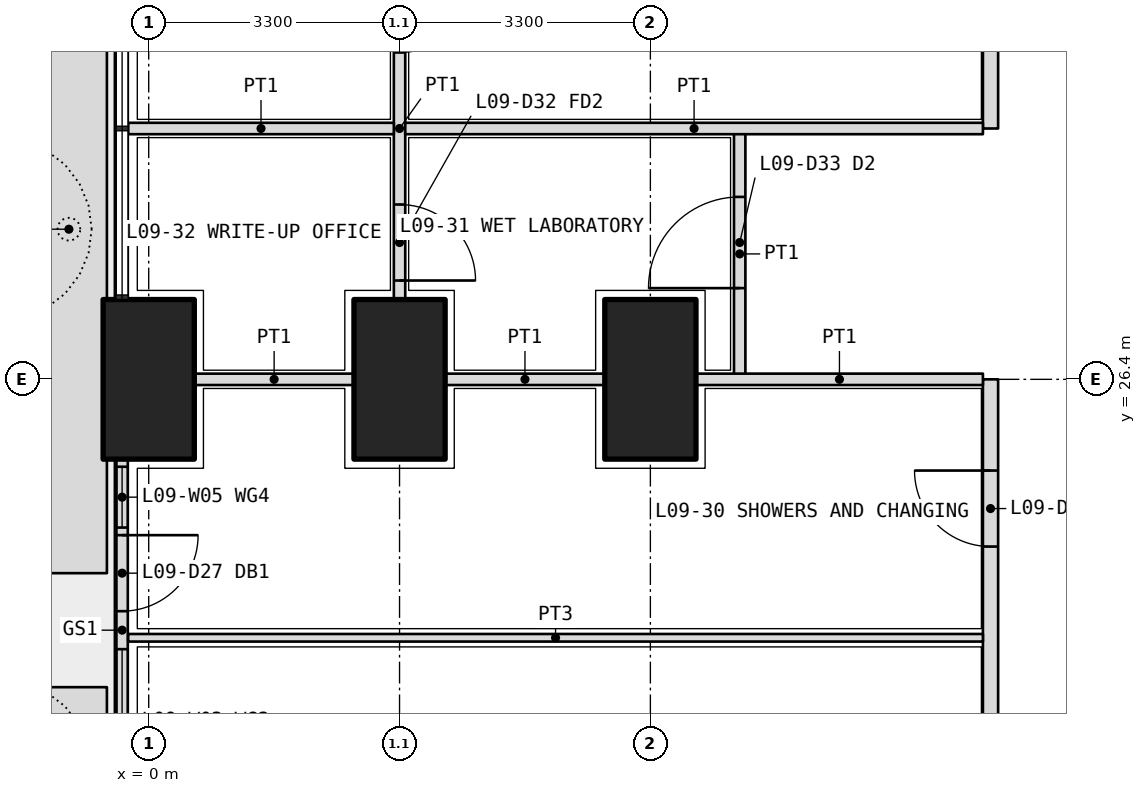
"""IFC4 building model, lengths in metres.
Left out: names, types, materials, properties, quantities, classifications, styles, units other than length and angle.
Written with IfcOpenShell. Run it as: python <this file> out.ifc"""

import sys

from ifc_helpers import new_model, si_unit, direction, frame, frame_2d, origin, origin_2d, place, context, subcontext, project, spatial, polyline, rectangle, outline, extrude, element, fill, save


model = new_model("IFC4")
c1 = context("Model", 3, precision=1e-05, world=origin(), true_north=direction((0.0, 1.0)))
c2 = subcontext(c1, "Body", "Model", "MODEL_VIEW")
j1 = project(units=[si_unit("LENGTHUNIT", "METRE"), si_unit("PLANEANGLEUNIT", "RADIAN")], contexts=[c1])
p1 = place(None, origin())
s1 = spatial("IfcSite", under=j1, at=p1, CompositionType="ELEMENT")
p2 = place(p1, origin())
s2 = spatial("IfcBuilding", under=s1, at=p2, CompositionType="ELEMENT")
p3 = place(p2, frame((0.0, 0.0, 42.3)))
s3 = spatial("IfcBuildingStorey", under=s2, at=p3, CompositionType="ELEMENT", Elevation=42.3)
for number, where, z_axis, x_axis in (
    (1, (0.0, 26.4, 0.0), (0.0, 0.0, 1.0), (0.0, 1.0, 0.0)),
    (2, (3.3, 26.4, 0.0), (0.0, 0.0, 1.0), (0.0, 1.0, 0.0)),
    (3, (6.6, 26.4, 0.0), (0.0, 0.0, 1.0), (0.0, 1.0, 0.0)),
):
    element("IfcColumn", number, at=place(p3, frame(where, z_axis=z_axis, x_axis=x_axis)), inside=s3, PredefinedType="COLUMN", context=c2, shape_type="SweptSolid", body=[
        extrude(rectangle(XDim=2.1, YDim=1.2, at=origin_2d()), origin(), (0.0, 0.0, 1.0), 4.2),
    ])
p4 = place(p3, origin())
e4 = element("IfcWall", 4, at=p4, inside=s3, PredefinedType="USERDEFINED", context=c2, shape_type="SweptSolid", body=[
    extrude(outline(polyline([(-1.55, 19.9), (-0.55, 19.9), (-0.55, 22.35), (-1.55, 22.35), (-1.55, 19.9)]), holes=[polyline([(-1.4, 20.05), (-0.7, 20.05), (-0.7, 22.2), (-1.4, 22.2), (-1.4, 20.05)])]), origin(), (0.0, 0.0, 1.0), 1.05),
])
p5 = place(p3, origin())
e5 = element("IfcWall", 5, at=p5, inside=s3, PredefinedType="USERDEFINED", context=c2, shape_type="SweptSolid", body=[
    extrude(outline(polyline([(-1.55, 23.85), (-0.55, 23.85), (-0.55, 32.9), (-1.55, 32.9), (-1.55, 23.85)]), holes=[polyline([(-1.4, 24.0), (-0.7, 24.0), (-0.7, 32.75), (-1.4, 32.75), (-1.4, 24.0)])]), origin(), (0.0, 0.0, 1.0), 1.05),
])
p6 = place(p3, frame((-0.35, 25.35, 0.0), z_axis=(0.0, 0.0, 1.0), x_axis=(0.0, -1.0, 0.0)))
e6 = element("IfcWall", 6, at=p6, inside=s3, PredefinedType="SOLIDWALL", context=c2, shape_type="SweptSolid", body=[
    extrude(rectangle(XDim=4.5, YDim=0.15, at=frame_2d((2.25, 0.0))), origin(), (0.0, 0.0, 1.0), 2.7),
])
p7 = place(p6, frame((1.0, 0.0, 0.0)))
e7 = element("IfcOpeningElement", 7, at=p7, cuts=e6, PredefinedType="OPENING", context=c2, shape_type="SweptSolid", body=[
    extrude(rectangle(XDim=1.0, YDim=2.4, at=frame_2d((0.5, 1.2))), frame((0.0, 0.085, 0.0), z_axis=(0.0, -1.0, 0.0), x_axis=(1.0, 0.0, 0.0)), (0.0, 0.0, 1.0), 0.17),
])
p8 = place(p6, frame((0.1, 0.0, 0.1)))
e8 = element("IfcOpeningElement", 8, at=p8, cuts=e6, PredefinedType="OPENING", context=c2, shape_type="SweptSolid", body=[
    extrude(rectangle(XDim=0.8, YDim=2.3, at=frame_2d((0.4, 1.15))), frame((0.0, 0.085, 0.0), z_axis=(0.0, -1.0, 0.0), x_axis=(1.0, 0.0, 0.0)), (0.0, 0.0, 1.0), 0.17),
])
p9 = place(p6, frame((2.5, 0.0, 0.1)))
e9 = element("IfcOpeningElement", 9, at=p9, cuts=e6, PredefinedType="OPENING", context=c2, shape_type="SweptSolid", body=[
    extrude(rectangle(XDim=1.9, YDim=2.3, at=frame_2d((0.95, 1.15))), frame((0.0, 0.085, 0.0), z_axis=(0.0, -1.0, 0.0), x_axis=(1.0, 0.0, 0.0)), (0.0, 0.0, 1.0), 0.17),
])
p10 = place(p3, frame((11.075, 11.175, 0.0), z_axis=(0.0, 0.0, 1.0), x_axis=(0.0, 1.0, 0.0)))
e10 = element("IfcWall", 10, at=p10, inside=s3, PredefinedType="PARTITIONING", context=c2, shape_type="SweptSolid", body=[
    extrude(rectangle(XDim=15.225, YDim=0.2, at=frame_2d((7.612, 0.0))), origin(), (0.0, 0.0, 1.0), 2.85),
])
p11 = place(p10, frame((0.363, 0.0, 0.0)))
e11 = element("IfcOpeningElement", 11, at=p11, cuts=e10, PredefinedType="OPENING", context=c2, shape_type="SweptSolid", body=[
    extrude(rectangle(XDim=1.2, YDim=2.1, at=frame_2d((0.6, 1.05))), frame((0.0, 0.11, 0.0), z_axis=(0.0, -1.0, 0.0), x_axis=(1.0, 0.0, 0.0)), (0.0, 0.0, 1.0), 0.22),
])
p12 = place(p10, frame((2.575, 0.0, 0.0)))
e12 = element("IfcOpeningElement", 12, at=p12, cuts=e10, PredefinedType="OPENING", context=c2, shape_type="SweptSolid", body=[
    extrude(rectangle(XDim=1.0, YDim=2.1, at=frame_2d((0.5, 1.05))), frame((0.0, 0.11, 0.0), z_axis=(0.0, -1.0, 0.0), x_axis=(1.0, 0.0, 0.0)), (0.0, 0.0, 1.0), 0.22),
])
p13 = place(p10, frame((5.65, 0.0, 0.0)))
e13 = element("IfcOpeningElement", 13, at=p13, cuts=e10, PredefinedType="OPENING", context=c2, shape_type="SweptSolid", body=[
    extrude(rectangle(XDim=0.9, YDim=2.1, at=frame_2d((0.45, 1.05))), frame((0.0, 0.11, 0.0), z_axis=(0.0, -1.0, 0.0), x_axis=(1.0, 0.0, 0.0)), (0.0, 0.0, 1.0), 0.22),
])
p14 = place(p10, frame((9.5, 0.0, 0.0)))
e14 = element("IfcOpeningElement", 14, at=p14, cuts=e10, PredefinedType="OPENING", context=c2, shape_type="SweptSolid", body=[
    extrude(rectangle(XDim=0.9, YDim=2.1, at=frame_2d((0.45, 1.05))), frame((0.0, 0.11, 0.0), z_axis=(0.0, -1.0, 0.0), x_axis=(1.0, 0.0, 0.0)), (0.0, 0.0, 1.0), 0.22),
])
p15 = place(p10, frame((13.025, 0.0, 0.0)))
e15 = element("IfcOpeningElement", 15, at=p15, cuts=e10, PredefinedType="OPENING", context=c2, shape_type="SweptSolid", body=[
    extrude(rectangle(XDim=1.0, YDim=2.1, at=frame_2d((0.5, 1.05))), frame((0.0, 0.11, 0.0), z_axis=(0.0, -1.0, 0.0), x_axis=(1.0, 0.0, 0.0)), (0.0, 0.0, 1.0), 0.22),
])
p16 = place(p3, frame((11.075, 29.7, 0.0), z_axis=(0.0, 0.0, 1.0), x_axis=(0.0, 1.0, 0.0)))
e16 = element("IfcWall", 16, at=p16, inside=s3, PredefinedType="PARTITIONING", context=c2, shape_type="SweptSolid", body=[
    extrude(rectangle(XDim=5.325, YDim=0.2, at=frame_2d((2.663, 0.0))), origin(), (0.0, 0.0, 1.0), 2.85),
])
p17 = place(p16, frame((2.212, 0.0, 0.0)))
e17 = element("IfcOpeningElement", 17, at=p17, cuts=e16, PredefinedType="OPENING", context=c2, shape_type="SweptSolid", body=[
    extrude(rectangle(XDim=1.0, YDim=2.1, at=frame_2d((0.5, 1.05))), frame((0.0, 0.11, 0.0), z_axis=(0.0, -1.0, 0.0), x_axis=(1.0, 0.0, 0.0)), (0.0, 0.0, 1.0), 0.22),
])
p18 = place(p3, frame((3.3, 31.95, 0.0), z_axis=(0.0, 0.0, 1.0), x_axis=(0.0, -1.0, 0.0)))
e18 = element("IfcWall", 18, at=p18, inside=s3, PredefinedType="PARTITIONING", context=c2, shape_type="SweptSolid", body=[
    extrude(rectangle(XDim=4.5, YDim=0.15, at=frame_2d((2.25, 0.0))), origin(), (0.0, 0.0, 1.0), 3.9),
])
p19 = place(p18, frame((3.25, 0.0, 0.0)))
e19 = element("IfcOpeningElement", 19, at=p19, cuts=e18, PredefinedType="OPENING", context=c2, shape_type="SweptSolid", body=[
    extrude(rectangle(XDim=1.0, YDim=2.1, at=frame_2d((0.5, 1.05))), frame((0.0, 0.085, 0.0), z_axis=(0.0, -1.0, 0.0), x_axis=(1.0, 0.0, 0.0)), (0.0, 0.0, 1.0), 0.17),
])
p20 = place(p18, frame((0.25, 0.0, 0.0)))
e20 = element("IfcOpeningElement", 20, at=p20, cuts=e18, PredefinedType="OPENING", context=c2, shape_type="SweptSolid", body=[
    extrude(rectangle(XDim=1.0, YDim=2.1, at=frame_2d((0.5, 1.05))), frame((0.0, 0.085, 0.0), z_axis=(0.0, -1.0, 0.0), x_axis=(1.0, 0.0, 0.0)), (0.0, 0.0, 1.0), 0.17),
])
p21 = place(p3, frame((-0.27, 23.0, 0.0), z_axis=(0.0, 0.0, 1.0), x_axis=(1.0, 0.0, 0.0)))
e21 = element("IfcWall", 21, at=p21, inside=s3, PredefinedType="PARTITIONING", context=c2, shape_type="SweptSolid", body=[
    extrude(rectangle(XDim=11.245, YDim=0.1, at=frame_2d((5.623, 0.0))), origin(), (0.0, 0.0, 1.0), 2.7),
])
p22 = place(p3, frame((7.775, 26.4, 0.0), z_axis=(0.0, 0.0, 1.0), x_axis=(0.0, 1.0, 0.0)))
e22 = element("IfcWall", 22, at=p22, inside=s3, PredefinedType="PARTITIONING", context=c2, shape_type="SweptSolid", body=[
    extrude(rectangle(XDim=3.3, YDim=0.15, at=frame_2d((1.65, 0.0))), origin(), (0.0, 0.0, 1.0), 2.85),
])
p23 = place(p22, frame((1.2, 0.0, 0.0)))
e23 = element("IfcOpeningElement", 23, at=p23, cuts=e22, PredefinedType="OPENING", context=c2, shape_type="SweptSolid", body=[
    extrude(rectangle(XDim=1.2, YDim=2.1, at=frame_2d((0.6, 1.05))), frame((0.0, 0.085, 0.0), z_axis=(0.0, -1.0, 0.0), x_axis=(1.0, 0.0, 0.0)), (0.0, 0.0, 1.0), 0.17),
])
p24 = place(p3, frame((0.6, 26.4, 0.0), z_axis=(0.0, 0.0, 1.0), x_axis=(1.0, 0.0, 0.0)))
e24 = element("IfcWall", 24, at=p24, inside=s3, PredefinedType="PARTITIONING", context=c2, shape_type="SweptSolid", body=[
    extrude(rectangle(XDim=2.1, YDim=0.15, at=frame_2d((1.05, 0.0))), origin(), (0.0, 0.0, 1.0), 2.85),
])
p25 = place(p3, frame((3.9, 26.4, 0.0), z_axis=(0.0, 0.0, 1.0), x_axis=(1.0, 0.0, 0.0)))
e25 = element("IfcWall", 25, at=p25, inside=s3, PredefinedType="PARTITIONING", context=c2, shape_type="SweptSolid", body=[
    extrude(rectangle(XDim=2.1, YDim=0.15, at=frame_2d((1.05, 0.0))), origin(), (0.0, 0.0, 1.0), 2.85),
])
p26 = place(p3, frame((7.2, 26.4, 0.0), z_axis=(0.0, 0.0, 1.0), x_axis=(1.0, 0.0, 0.0)))
e26 = element("IfcWall", 26, at=p26, inside=s3, PredefinedType="PARTITIONING", context=c2, shape_type="SweptSolid", body=[
    extrude(rectangle(XDim=3.775, YDim=0.15, at=frame_2d((1.888, 0.0))), origin(), (0.0, 0.0, 1.0), 2.85),
])
p27 = place(p3, frame((-0.27, 29.7, 0.0), z_axis=(0.0, 0.0, 1.0), x_axis=(1.0, 0.0, 0.0)))
e27 = element("IfcWall", 27, at=p27, inside=s3, PredefinedType="PARTITIONING", context=c2, shape_type="SweptSolid", body=[
    extrude(rectangle(XDim=3.495, YDim=0.15, at=frame_2d((1.748, 0.0))), origin(), (0.0, 0.0, 1.0), 2.7),
])
p28 = place(p3, frame((3.375, 29.7, 0.0), z_axis=(0.0, 0.0, 1.0), x_axis=(1.0, 0.0, 0.0)))
e28 = element("IfcWall", 28, at=p28, inside=s3, PredefinedType="PARTITIONING", context=c2, shape_type="SweptSolid", body=[
    extrude(rectangle(XDim=7.6, YDim=0.15, at=frame_2d((3.8, 0.0))), origin(), (0.0, 0.0, 1.0), 3.9),
])
p29 = place(p7, origin())
e29 = element("IfcDoor", 29, at=p29, inside=s3, OperationType="SINGLE_SWING_LEFT", PredefinedType="DOOR", context=c2, shape_type="SweptSolid", body=[
    extrude(rectangle(XDim=1.0, YDim=2.4, at=frame_2d((0.5, 1.2))), frame((0.0, 0.025, 0.0), z_axis=(0.0, -1.0, 0.0), x_axis=(1.0, 0.0, 0.0)), (0.0, 0.0, 1.0), 0.05),
])
fill(e7, e29)
p30 = place(p8, origin())
e30 = element("IfcWindow", 30, at=p30, inside=s3, PartitioningType="SINGLE_PANEL", PredefinedType="WINDOW", context=c2, shape_type="SweptSolid", body=[
    extrude(rectangle(XDim=0.8, YDim=2.3, at=frame_2d((0.4, 1.15))), frame((0.0, 0.03, 0.0), z_axis=(0.0, -1.0, 0.0), x_axis=(1.0, 0.0, 0.0)), (0.0, 0.0, 1.0), 0.06),
])
fill(e8, e30)
p31 = place(p9, origin())
e31 = element("IfcWindow", 31, at=p31, inside=s3, PartitioningType="SINGLE_PANEL", PredefinedType="WINDOW", context=c2, shape_type="SweptSolid", body=[
    extrude(rectangle(XDim=1.9, YDim=2.3, at=frame_2d((0.95, 1.15))), frame((0.0, 0.03, 0.0), z_axis=(0.0, -1.0, 0.0), x_axis=(1.0, 0.0, 0.0)), (0.0, 0.0, 1.0), 0.06),
])
fill(e9, e31)
p32 = place(p15, origin())
e32 = element("IfcDoor", 32, at=p32, inside=s3, OperationType="SINGLE_SWING_RIGHT", PredefinedType="DOOR", context=c2, shape_type="SweptSolid", body=[
    extrude(rectangle(XDim=1.0, YDim=2.1, at=frame_2d((0.5, 1.05))), frame((0.0, 0.025, 0.0), z_axis=(0.0, -1.0, 0.0), x_axis=(1.0, 0.0, 0.0)), (0.0, 0.0, 1.0), 0.05),
])
fill(e15, e32)
p33 = place(p23, origin())
e33 = element("IfcDoor", 33, at=p33, inside=s3, OperationType="DOUBLE_DOOR_SINGLE_SWING", PredefinedType="DOOR", context=c2, shape_type="SweptSolid", body=[
    extrude(rectangle(XDim=1.2, YDim=2.1, at=frame_2d((0.6, 1.05))), frame((0.0, 0.025, 0.0), z_axis=(0.0, -1.0, 0.0), x_axis=(1.0, 0.0, 0.0)), (0.0, 0.0, 1.0), 0.05),
])
fill(e23, e33)
p34 = place(p19, origin())
e34 = element("IfcDoor", 34, at=p34, inside=s3, OperationType="SINGLE_SWING_RIGHT", PredefinedType="DOOR", context=c2, shape_type="SweptSolid", body=[
    extrude(rectangle(XDim=1.0, YDim=2.1, at=frame_2d((0.5, 1.05))), frame((0.0, 0.025, 0.0), z_axis=(0.0, -1.0, 0.0), x_axis=(1.0, 0.0, 0.0)), (0.0, 0.0, 1.0), 0.05),
])
fill(e19, e34)
save(model, sys.argv[1])
